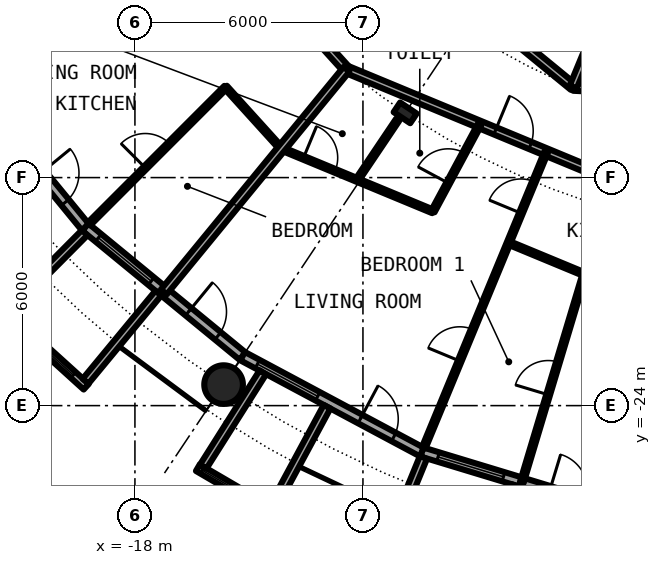
"""IFC4 building model, lengths in metres.
Left out: names, types, materials, properties, quantities, classifications, styles, units other than length and angle.
Written with IfcOpenShell. Run it as: python <this file> out.ifc"""

import sys

from ifc_helpers import new_model, si_unit, direction, frame, frame_2d, origin, origin_2d, place, context, subcontext, project, spatial, rectangle, circle, hollow_circle, i_section, extrude, element, fill, save


model = new_model("IFC4")
c1 = context("Model", 3, precision=1e-05, world=origin(), true_north=direction((0.0, 1.0)))
c2 = subcontext(c1, "Body", "Model", "MODEL_VIEW")
j1 = project(units=[si_unit("LENGTHUNIT", "METRE"), si_unit("PLANEANGLEUNIT", "RADIAN")], contexts=[c1])
p1 = place(None, origin())
s1 = spatial("IfcSite", under=j1, at=p1, CompositionType="ELEMENT")
p2 = place(p1, origin())
s2 = spatial("IfcBuilding", under=s1, at=p2, CompositionType="ELEMENT")
p3 = place(p2, frame((0.0, 0.0, 75.8)))
s3 = spatial("IfcBuildingStorey", under=s2, at=p3, CompositionType="ELEMENT", Elevation=75.8)
p4 = place(p3, frame((-15.667, -23.448, 0.0), z_axis=(0.0, 0.0, 1.0), x_axis=(1.0, 0.0, 0.0)))
e1 = element("IfcColumn", 1, at=p4, inside=s3, PredefinedType="COLUMN", context=c2, shape_type="SweptSolid", body=[
    extrude(hollow_circle(Radius=0.508, WallThickness=0.04, at=origin_2d()), origin(), (0.0, 0.0, 1.0), 3.05),
])
p5 = place(p3, frame((-10.889, -16.297, 0.0), z_axis=(0.0, 0.0, 1.0), x_axis=(-0.55557023302, -0.831469612303, 0.0)))
e2 = element("IfcColumn", 2, at=p5, inside=s3, PredefinedType="COLUMN", context=c2, shape_type="SweptSolid", body=[
    extrude(i_section(OverallWidth=0.306, OverallDepth=0.524, WebThickness=0.021, FlangeThickness=0.04, FilletRadius=0.027, at=origin_2d()), origin(), (0.0, 0.0, 1.0), 3.05),
])
p6 = place(p3, frame((-22.699, -15.167, 0.0), z_axis=(0.0, 0.0, 1.0), x_axis=(0.634382322723, -0.773019449054, 0.0)))
e3 = element("IfcWall", 3, at=p6, inside=s3, PredefinedType="SOLIDWALL", context=c2, shape_type="SweptSolid", body=[
    extrude(rectangle(XDim=5.352, YDim=0.25, at=frame_2d((2.676, 0.0))), origin(), (0.0, 0.0, 1.0), 2.7),
])
p7 = place(p6, frame((0.441, 0.0, 0.3)))
e4 = element("IfcOpeningElement", 4, at=p7, cuts=e3, PredefinedType="OPENING", context=c2, shape_type="SweptSolid", body=[
    extrude(rectangle(XDim=1.8, YDim=2.1, at=frame_2d((0.9, 1.05))), frame((0.0, 0.135, 0.0), z_axis=(0.0, -1.0, 0.0), x_axis=(1.0, 0.0, 0.0)), (0.0, 0.0, 1.0), 0.27),
])
p8 = place(p6, frame((3.51, 0.0, 0.0)))
e5 = element("IfcOpeningElement", 5, at=p8, cuts=e3, PredefinedType="OPENING", context=c2, shape_type="SweptSolid", body=[
    extrude(rectangle(XDim=1.0, YDim=2.2, at=frame_2d((0.5, 1.1))), frame((0.0, 0.135, 0.0), z_axis=(0.0, -1.0, 0.0), x_axis=(1.0, 0.0, 0.0)), (0.0, 0.0, 1.0), 0.27),
])
p9 = place(p3, frame((-19.304, -19.304, 0.0), z_axis=(0.0, 0.0, 1.0), x_axis=(0.773019449054, -0.634382322723, 0.0)))
e6 = element("IfcWall", 6, at=p9, inside=s3, PredefinedType="SOLIDWALL", context=c2, shape_type="SweptSolid", body=[
    extrude(rectangle(XDim=5.352, YDim=0.25, at=frame_2d((2.676, 0.0))), origin(), (0.0, 0.0, 1.0), 2.7),
])
p10 = place(p9, frame((0.441, 0.0, 0.3)))
e7 = element("IfcOpeningElement", 7, at=p10, cuts=e6, PredefinedType="OPENING", context=c2, shape_type="SweptSolid", body=[
    extrude(rectangle(XDim=1.8, YDim=2.1, at=frame_2d((0.9, 1.05))), frame((0.0, 0.135, 0.0), z_axis=(0.0, -1.0, 0.0), x_axis=(1.0, 0.0, 0.0)), (0.0, 0.0, 1.0), 0.27),
])
p11 = place(p9, frame((3.51, 0.0, 0.0)))
e8 = element("IfcOpeningElement", 8, at=p11, cuts=e6, PredefinedType="OPENING", context=c2, shape_type="SweptSolid", body=[
    extrude(rectangle(XDim=1.0, YDim=2.2, at=frame_2d((0.5, 1.1))), frame((0.0, 0.135, 0.0), z_axis=(0.0, -1.0, 0.0), x_axis=(1.0, 0.0, 0.0)), (0.0, 0.0, 1.0), 0.27),
])
p12 = place(p3, frame((-21.5, -21.493, -0.03), z_axis=(0.0, 0.0, 1.0), x_axis=(0.740998365753, -0.671506829416, 0.0)))
e9 = element("IfcWall", 9, at=p12, inside=s3, PredefinedType="SOLIDWALL", context=c2, shape_type="SweptSolid", body=[
    extrude(rectangle(XDim=2.993, YDim=0.2, at=frame_2d((1.497, 0.0))), origin(), (0.0, 0.0, 1.0), 2.73),
])
p13 = place(p12, frame((0.457, 0.0, 0.33)))
e10 = element("IfcOpeningElement", 10, at=p13, cuts=e9, PredefinedType="OPENING", context=c2, shape_type="SweptSolid", body=[
    extrude(circle(Radius=1.04, at=frame_2d((1.04, 1.04))), frame((0.0, 0.11, 0.0), z_axis=(0.0, -1.0, 0.0), x_axis=(1.0, 0.0, 0.0)), (0.0, 0.0, 1.0), 0.22),
])
p14 = place(p3, frame((-19.323, -19.45, -0.03), z_axis=(0.0, 0.0, 1.0), x_axis=(-0.704476739375, -0.709727076896, 0.0)))
e11 = element("IfcWall", 11, at=p14, inside=s3, PredefinedType="SOLIDWALL", context=c2, shape_type="SweptSolid", body=[
    extrude(rectangle(XDim=2.883, YDim=0.2, at=frame_2d((1.441, 0.0))), origin(), (0.0, 0.0, 1.0), 2.73),
])
p15 = place(p3, frame((-17.384, -21.041, -0.03), z_axis=(0.0, 0.0, 1.0), x_axis=(-0.63709551667, -0.770784861449, 0.0)))
e12 = element("IfcWall", 12, at=p15, inside=s3, PredefinedType="SOLIDWALL", context=c2, shape_type="SweptSolid", body=[
    extrude(rectangle(XDim=3.006, YDim=0.2, at=frame_2d((1.503, 0.0))), origin(), (0.0, 0.0, 1.0), 2.73),
])
p16 = place(p3, frame((-15.167, -22.699, 0.0), z_axis=(0.0, 0.0, 1.0), x_axis=(0.881915646801, -0.471407246368, 0.0)))
e13 = element("IfcWall", 13, at=p16, inside=s3, PredefinedType="SOLIDWALL", context=c2, shape_type="SweptSolid", body=[
    extrude(rectangle(XDim=5.352, YDim=0.25, at=frame_2d((2.676, 0.0))), origin(), (0.0, 0.0, 1.0), 2.7),
])
p17 = place(p16, frame((0.441, 0.0, 0.3)))
e14 = element("IfcOpeningElement", 14, at=p17, cuts=e13, PredefinedType="OPENING", context=c2, shape_type="SweptSolid", body=[
    extrude(rectangle(XDim=1.8, YDim=2.1, at=frame_2d((0.9, 1.05))), frame((0.0, 0.135, 0.0), z_axis=(0.0, -1.0, 0.0), x_axis=(1.0, 0.0, 0.0)), (0.0, 0.0, 1.0), 0.27),
])
p18 = place(p16, frame((3.51, 0.0, 0.0)))
e15 = element("IfcOpeningElement", 15, at=p18, cuts=e13, PredefinedType="OPENING", context=c2, shape_type="SweptSolid", body=[
    extrude(rectangle(XDim=1.0, YDim=2.2, at=frame_2d((0.5, 1.1))), frame((0.0, 0.135, 0.0), z_axis=(0.0, -1.0, 0.0), x_axis=(1.0, 0.0, 0.0)), (0.0, 0.0, 1.0), 0.27),
])
p19 = place(p3, frame((-16.344, -25.633, -0.03), z_axis=(0.0, 0.0, 1.0), x_axis=(0.863346521872, -0.504611517081, 0.0)))
e16 = element("IfcWall", 16, at=p19, inside=s3, PredefinedType="SOLIDWALL", context=c2, shape_type="SweptSolid", body=[
    extrude(rectangle(XDim=2.336, YDim=0.2, at=frame_2d((1.168, 0.0))), origin(), (0.0, 0.0, 1.0), 2.73),
])
p20 = place(p19, frame((0.128, 0.0, 0.33)))
e17 = element("IfcOpeningElement", 17, at=p20, cuts=e16, PredefinedType="OPENING", context=c2, shape_type="SweptSolid", body=[
    extrude(circle(Radius=1.04, at=frame_2d((1.04, 1.04))), frame((0.0, 0.11, 0.0), z_axis=(0.0, -1.0, 0.0), x_axis=(1.0, 0.0, 0.0)), (0.0, 0.0, 1.0), 0.22),
])
p21 = place(p3, frame((-14.635, -23.126, -0.03), z_axis=(0.0, 0.0, 1.0), x_axis=(-0.534437802731, -0.845207805816, 0.0)))
e18 = element("IfcWall", 18, at=p21, inside=s3, PredefinedType="SOLIDWALL", context=c2, shape_type="SweptSolid", body=[
    extrude(rectangle(XDim=2.932, YDim=0.2, at=frame_2d((1.466, 0.0))), origin(), (0.0, 0.0, 1.0), 2.73),
])
p22 = place(p3, frame((-12.945, -24.029, -0.03), z_axis=(0.0, 0.0, 1.0), x_axis=(-0.474424310775, -0.88029629861, 0.0)))
e19 = element("IfcWall", 19, at=p22, inside=s3, PredefinedType="SOLIDWALL", context=c2, shape_type="SweptSolid", body=[
    extrude(rectangle(XDim=3.006, YDim=0.2, at=frame_2d((1.503, 0.0))), origin(), (0.0, 0.0, 1.0), 2.73),
])
p23 = place(p3, frame((-10.447, -25.222, 0.0), z_axis=(0.0, 0.0, 1.0), x_axis=(0.956965678721, -0.290201119486, 0.0)))
e20 = element("IfcWall", 20, at=p23, inside=s3, PredefinedType="SOLIDWALL", context=c2, shape_type="SweptSolid", body=[
    extrude(rectangle(XDim=5.351, YDim=0.25, at=frame_2d((2.676, 0.0))), origin(), (0.0, 0.0, 1.0), 2.7),
])
p24 = place(p23, frame((0.441, 0.0, 0.3)))
e21 = element("IfcOpeningElement", 21, at=p24, cuts=e20, PredefinedType="OPENING", context=c2, shape_type="SweptSolid", body=[
    extrude(rectangle(XDim=1.8, YDim=2.1, at=frame_2d((0.9, 1.05))), frame((0.0, 0.135, 0.0), z_axis=(0.0, -1.0, 0.0), x_axis=(1.0, 0.0, 0.0)), (0.0, 0.0, 1.0), 0.27),
])
p25 = place(p23, frame((3.51, 0.0, 0.0)))
e22 = element("IfcOpeningElement", 22, at=p25, cuts=e20, PredefinedType="OPENING", context=c2, shape_type="SweptSolid", body=[
    extrude(rectangle(XDim=1.0, YDim=2.2, at=frame_2d((0.5, 1.1))), frame((0.0, 0.135, 0.0), z_axis=(0.0, -1.0, 0.0), x_axis=(1.0, 0.0, 0.0)), (0.0, 0.0, 1.0), 0.27),
])
p26 = place(p3, frame((-10.409, -25.364, -0.03), z_axis=(0.0, 0.0, 1.0), x_axis=(-0.379509886562, -0.925187681501, 0.0)))
e23 = element("IfcWall", 23, at=p26, inside=s3, PredefinedType="SOLIDWALL", context=c2, shape_type="SweptSolid", body=[
    extrude(rectangle(XDim=2.883, YDim=0.2, at=frame_2d((1.441, 0.0))), origin(), (0.0, 0.0, 1.0), 2.73),
])
p27 = place(p3, frame((-8.009, -26.092, -0.03), z_axis=(0.0, 0.0, 1.0), x_axis=(-0.293406695073, -0.955987715029, 0.0)))
e24 = element("IfcWall", 24, at=p27, inside=s3, PredefinedType="SOLIDWALL", context=c2, shape_type="SweptSolid", body=[
    extrude(rectangle(XDim=3.006, YDim=0.2, at=frame_2d((1.503, 0.0))), origin(), (0.0, 0.0, 1.0), 2.73),
])
p28 = place(p3, frame((-15.617, -15.617, 0.0), z_axis=(0.0, 0.0, 1.0), x_axis=(0.671144831591, -0.741326254107, 0.0)))
e25 = element("IfcWall", 25, at=p28, inside=s3, PredefinedType="PARTITIONING", context=c2, shape_type="SweptSolid", body=[
    extrude(rectangle(XDim=2.181, YDim=0.1, at=frame_2d((1.091, 0.0))), origin(), (0.0, 0.0, 1.0), 2.7),
])
p29 = place(p3, frame((-14.15, -17.236, 0.0), z_axis=(0.0, 0.0, 1.0), x_axis=(0.923789421174, -0.382900907975, 0.0)))
e26 = element("IfcWall", 26, at=p29, inside=s3, PredefinedType="PARTITIONING", context=c2, shape_type="SweptSolid", body=[
    extrude(rectangle(XDim=4.319, YDim=0.1, at=frame_2d((2.16, 0.0))), origin(), (0.0, 0.0, 1.0), 2.7),
])
p30 = place(p29, frame((0.634, 0.0, 0.0)))
e27 = element("IfcOpeningElement", 27, at=p30, cuts=e26, PredefinedType="OPENING", context=c2, shape_type="SweptSolid", body=[
    extrude(rectangle(XDim=0.9, YDim=2.3, at=frame_2d((0.45, 1.15))), frame((0.0, 0.06, 0.0), z_axis=(0.0, -1.0, 0.0), x_axis=(1.0, 0.0, 0.0)), (0.0, 0.0, 1.0), 0.12),
])
p31 = place(p3, frame((-8.168, -19.716, 0.0), z_axis=(0.0, 0.0, 1.0), x_axis=(0.923791567638, -0.382895729358, 0.0)))
e28 = element("IfcWall", 28, at=p31, inside=s3, PredefinedType="PARTITIONING", context=c2, shape_type="SweptSolid", body=[
    extrude(rectangle(XDim=6.474, YDim=0.1, at=frame_2d((3.237, 0.0))), origin(), (0.0, 0.0, 1.0), 2.7),
])
p32 = place(p3, frame((-16.193, -11.004, 0.0), z_axis=(0.0, 0.0, 1.0), x_axis=(0.671601747072, -0.740912338492, 0.0)))
e29 = element("IfcWall", 29, at=p32, inside=s3, PredefinedType="PARTITIONING", context=c2, shape_type="SweptSolid", body=[
    extrude(rectangle(XDim=5.597, YDim=0.2, at=frame_2d((2.799, 0.0))), origin(), (0.0, 0.0, 1.0), 2.38),
])
p33 = place(p32, frame((3.18, 0.0, 0.0)))
e30 = element("IfcOpeningElement", 30, at=p33, cuts=e29, PredefinedType="OPENING", context=c2, shape_type="SweptSolid", body=[
    extrude(rectangle(XDim=1.0, YDim=2.3, at=frame_2d((0.5, 1.15))), frame((0.0, 0.11, 0.0), z_axis=(0.0, -1.0, 0.0), x_axis=(1.0, 0.0, 0.0)), (0.0, 0.0, 1.0), 0.22),
])
p34 = place(p3, frame((-12.436, -15.15, 0.0), z_axis=(0.0, 0.0, 1.0), x_axis=(0.923858130651, -0.38273509694, 0.0)))
e31 = element("IfcWall", 31, at=p34, inside=s3, PredefinedType="PARTITIONING", context=c2, shape_type="SweptSolid", body=[
    extrude(rectangle(XDim=11.382, YDim=0.2, at=frame_2d((5.691, 0.0))), origin(), (0.0, 0.0, 1.0), 2.7),
])
p35 = place(p34, frame((4.239, 0.0, 0.0)))
e32 = element("IfcOpeningElement", 32, at=p35, cuts=e31, PredefinedType="OPENING", context=c2, shape_type="SweptSolid", body=[
    extrude(rectangle(XDim=1.0, YDim=2.3, at=frame_2d((0.5, 1.15))), frame((0.0, 0.11, 0.0), z_axis=(0.0, -1.0, 0.0), x_axis=(1.0, 0.0, 0.0)), (0.0, 0.0, 1.0), 0.22),
])
p36 = place(p3, frame((-14.05, -9.392, 0.0), z_axis=(0.0, 0.0, 1.0), x_axis=(0.773074935257, -0.634314704605, 0.0)))
e33 = element("IfcWall", 33, at=p36, inside=s3, PredefinedType="PARTITIONING", context=c2, shape_type="SweptSolid", body=[
    extrude(rectangle(XDim=9.809, YDim=0.2, at=frame_2d((4.904, 0.0))), origin(), (0.0, 0.0, 1.0), 2.7),
])
p37 = place(p36, frame((4.402, 0.0, 0.0)))
e34 = element("IfcOpeningElement", 34, at=p37, cuts=e33, PredefinedType="OPENING", context=c2, shape_type="SweptSolid", body=[
    extrude(rectangle(XDim=1.0, YDim=2.3, at=frame_2d((0.5, 1.15))), frame((0.0, 0.11, 0.0), z_axis=(0.0, -1.0, 0.0), x_axis=(1.0, 0.0, 0.0)), (0.0, 0.0, 1.0), 0.22),
])
p38 = place(p3, frame((-6.464, -15.616, 0.0), z_axis=(0.0, 0.0, 1.0), x_axis=(0.998805876564, -0.048855101495, 0.0)))
e35 = element("IfcWall", 35, at=p38, inside=s3, PredefinedType="PARTITIONING", context=c2, shape_type="SweptSolid", body=[
    extrude(rectangle(XDim=11.384, YDim=0.2, at=frame_2d((5.692, 0.0))), origin(), (0.0, 0.0, 1.0), 2.7),
])
p39 = place(p38, frame((6.004, 0.0, 0.0)))
e36 = element("IfcOpeningElement", 36, at=p39, cuts=e35, PredefinedType="OPENING", context=c2, shape_type="SweptSolid", body=[
    extrude(rectangle(XDim=1.0, YDim=2.3, at=frame_2d((0.5, 1.15))), frame((0.0, 0.11, 0.0), z_axis=(0.0, -1.0, 0.0), x_axis=(1.0, 0.0, 0.0)), (0.0, 0.0, 1.0), 0.22),
])
p40 = place(p3, frame((-22.595, -15.097, 0.0), z_axis=(0.0, 0.0, 1.0), x_axis=(0.831505405283, 0.555516661303, 0.0)))
e37 = element("IfcWall", 37, at=p40, inside=s3, PredefinedType="PARTITIONING", context=c2, shape_type="SweptSolid", body=[
    extrude(rectangle(XDim=7.312, YDim=0.2, at=frame_2d((3.656, 0.0))), origin(), (0.0, 0.0, 1.0), 2.7),
])
p41 = place(p3, frame((-19.21, -19.222, 0.0), z_axis=(0.0, 0.0, 1.0), x_axis=(0.706914880313, 0.707298629994, 0.0)))
e38 = element("IfcWall", 38, at=p41, inside=s3, PredefinedType="PARTITIONING", context=c2, shape_type="SweptSolid", body=[
    extrude(rectangle(XDim=5.09, YDim=0.1, at=frame_2d((2.545, 0.0))), origin(), (0.0, 0.0, 1.0), 2.7),
])
p42 = place(p41, frame((2.095, 0.0, 0.0)))
e39 = element("IfcOpeningElement", 39, at=p42, cuts=e38, PredefinedType="OPENING", context=c2, shape_type="SweptSolid", body=[
    extrude(rectangle(XDim=0.9, YDim=2.3, at=frame_2d((0.45, 1.15))), frame((0.0, 0.06, 0.0), z_axis=(0.0, -1.0, 0.0), x_axis=(1.0, 0.0, 0.0)), (0.0, 0.0, 1.0), 0.12),
])
p43 = place(p3, frame((-17.239, -21.008, 0.0), z_axis=(0.0, 0.0, 1.0), x_axis=(0.634318093068, 0.773072154981, 0.0)))
e40 = element("IfcWall", 40, at=p43, inside=s3, PredefinedType="PARTITIONING", context=c2, shape_type="SweptSolid", body=[
    extrude(rectangle(XDim=7.576, YDim=0.2, at=frame_2d((3.788, 0.0))), origin(), (0.0, 0.0, 1.0), 2.7),
])
p44 = place(p3, frame((-12.153, -18.064, 0.0), z_axis=(0.0, 0.0, 1.0), x_axis=(0.558383137663, 0.829583191472, 0.0)))
e41 = element("IfcWall", 41, at=p44, inside=s3, PredefinedType="PARTITIONING", context=c2, shape_type="SweptSolid", body=[
    extrude(rectangle(XDim=1.909, YDim=0.1, at=frame_2d((0.955, 0.0))), origin(), (0.0, 0.0, 1.0), 2.7),
])
p45 = place(p3, frame((-10.399, -25.106, 0.0), z_axis=(0.0, 0.0, 1.0), x_axis=(0.382697543868, 0.923873687209, 0.0)))
e42 = element("IfcWall", 42, at=p45, inside=s3, PredefinedType="PARTITIONING", context=c2, shape_type="SweptSolid", body=[
    extrude(rectangle(XDim=8.419, YDim=0.1, at=frame_2d((4.209, 0.0))), origin(), (0.0, 0.0, 1.0), 2.7),
])
p46 = place(p45, frame((6.678, 0.0, 0.0)))
e43 = element("IfcOpeningElement", 43, at=p46, cuts=e42, PredefinedType="OPENING", context=c2, shape_type="SweptSolid", body=[
    extrude(rectangle(XDim=0.9, YDim=2.3, at=frame_2d((0.45, 1.15))), frame((0.0, 0.06, 0.0), z_axis=(0.0, -1.0, 0.0), x_axis=(1.0, 0.0, 0.0)), (0.0, 0.0, 1.0), 0.12),
])
p47 = place(p45, frame((2.468, 0.0, 0.0)))
e44 = element("IfcOpeningElement", 44, at=p47, cuts=e42, PredefinedType="OPENING", context=c2, shape_type="SweptSolid", body=[
    extrude(rectangle(XDim=0.9, YDim=2.3, at=frame_2d((0.45, 1.15))), frame((0.0, 0.06, 0.0), z_axis=(0.0, -1.0, 0.0), x_axis=(1.0, 0.0, 0.0)), (0.0, 0.0, 1.0), 0.12),
])
p48 = place(p3, frame((-10.16, -18.89, 0.0), z_axis=(0.0, 0.0, 1.0), x_axis=(0.4736792609, 0.880697426925, 0.0)))
e45 = element("IfcWall", 45, at=p48, inside=s3, PredefinedType="PARTITIONING", context=c2, shape_type="SweptSolid", body=[
    extrude(rectangle(XDim=2.597, YDim=0.1, at=frame_2d((1.298, 0.0))), origin(), (0.0, 0.0, 1.0), 2.7),
])
p49 = place(p48, frame((0.848, 0.0, 0.0)))
e46 = element("IfcOpeningElement", 46, at=p49, cuts=e45, PredefinedType="OPENING", context=c2, shape_type="SweptSolid", body=[
    extrude(rectangle(XDim=0.9, YDim=2.3, at=frame_2d((0.45, 1.15))), frame((0.0, 0.06, 0.0), z_axis=(0.0, -1.0, 0.0), x_axis=(1.0, 0.0, 0.0)), (0.0, 0.0, 1.0), 0.12),
])
p50 = place(p3, frame((-7.821, -26.025, 0.0), z_axis=(0.0, 0.0, 1.0), x_axis=(0.287793773423, 0.957692405723, 0.0)))
e47 = element("IfcWall", 47, at=p50, inside=s3, PredefinedType="PARTITIONING", context=c2, shape_type="SweptSolid", body=[
    extrude(rectangle(XDim=5.726, YDim=0.1, at=frame_2d((2.863, 0.0))), origin(), (0.0, 0.0, 1.0), 2.7),
])
p51 = place(p50, frame((2.413, 0.0, 0.0)))
e48 = element("IfcOpeningElement", 48, at=p51, cuts=e47, PredefinedType="OPENING", context=c2, shape_type="SweptSolid", body=[
    extrude(rectangle(XDim=0.9, YDim=2.3, at=frame_2d((0.45, 1.15))), frame((0.0, 0.06, 0.0), z_axis=(0.0, -1.0, 0.0), x_axis=(1.0, 0.0, 0.0)), (0.0, 0.0, 1.0), 0.12),
])
p52 = place(p3, frame((-6.467, -15.614, 0.0), z_axis=(0.0, 0.0, 1.0), x_axis=(0.382646942224, 0.923894646378, 0.0)))
e49 = element("IfcWall", 49, at=p52, inside=s3, PredefinedType="PARTITIONING", context=c2, shape_type="SweptSolid", body=[
    extrude(rectangle(XDim=9.181, YDim=0.2, at=frame_2d((4.59, 0.0))), origin(), (0.0, 0.0, 1.0), 2.7),
])
p53 = place(p8, origin())
e50 = element("IfcDoor", 50, at=p53, inside=s3, OperationType="SINGLE_SWING_LEFT", PredefinedType="DOOR", context=c2, shape_type="SweptSolid", body=[
    extrude(rectangle(XDim=1.0, YDim=2.2, at=frame_2d((0.5, 1.1))), frame((0.0, 0.025, 0.0), z_axis=(0.0, -1.0, 0.0), x_axis=(1.0, 0.0, 0.0)), (0.0, 0.0, 1.0), 0.05),
])
fill(e5, e50)
p54 = place(p10, origin())
e51 = element("IfcWindow", 51, at=p54, inside=s3, PartitioningType="SINGLE_PANEL", PredefinedType="WINDOW", context=c2, shape_type="SweptSolid", body=[
    extrude(rectangle(XDim=1.8, YDim=2.1, at=frame_2d((0.9, 1.05))), frame((0.0, 0.03, 0.0), z_axis=(0.0, -1.0, 0.0), x_axis=(1.0, 0.0, 0.0)), (0.0, 0.0, 1.0), 0.06),
])
fill(e7, e51)
p55 = place(p13, origin())
e52 = element("IfcWindow", 52, at=p55, inside=s3, PartitioningType="SINGLE_PANEL", PredefinedType="WINDOW", context=c2, shape_type="SweptSolid", body=[
    extrude(circle(Radius=1.04, at=frame_2d((1.04, 1.04))), frame((0.0, 0.03, 0.0), z_axis=(0.0, -1.0, 0.0), x_axis=(1.0, 0.0, 0.0)), (0.0, 0.0, 1.0), 0.06),
])
fill(e10, e52)
p56 = place(p11, origin())
e53 = element("IfcDoor", 53, at=p56, inside=s3, OperationType="SINGLE_SWING_LEFT", PredefinedType="DOOR", context=c2, shape_type="SweptSolid", body=[
    extrude(rectangle(XDim=1.0, YDim=2.2, at=frame_2d((0.5, 1.1))), frame((0.0, 0.025, 0.0), z_axis=(0.0, -1.0, 0.0), x_axis=(1.0, 0.0, 0.0)), (0.0, 0.0, 1.0), 0.05),
])
fill(e8, e53)
p57 = place(p17, origin())
e54 = element("IfcWindow", 54, at=p57, inside=s3, PartitioningType="SINGLE_PANEL", PredefinedType="WINDOW", context=c2, shape_type="SweptSolid", body=[
    extrude(rectangle(XDim=1.8, YDim=2.1, at=frame_2d((0.9, 1.05))), frame((0.0, 0.03, 0.0), z_axis=(0.0, -1.0, 0.0), x_axis=(1.0, 0.0, 0.0)), (0.0, 0.0, 1.0), 0.06),
])
fill(e14, e54)
p58 = place(p20, origin())
e55 = element("IfcWindow", 55, at=p58, inside=s3, PartitioningType="SINGLE_PANEL", PredefinedType="WINDOW", context=c2, shape_type="SweptSolid", body=[
    extrude(circle(Radius=1.04, at=frame_2d((1.04, 1.04))), frame((0.0, 0.03, 0.0), z_axis=(0.0, -1.0, 0.0), x_axis=(1.0, 0.0, 0.0)), (0.0, 0.0, 1.0), 0.06),
])
fill(e17, e55)
p59 = place(p18, origin())
e56 = element("IfcDoor", 56, at=p59, inside=s3, OperationType="SINGLE_SWING_LEFT", PredefinedType="DOOR", context=c2, shape_type="SweptSolid", body=[
    extrude(rectangle(XDim=1.0, YDim=2.2, at=frame_2d((0.5, 1.1))), frame((0.0, 0.025, 0.0), z_axis=(0.0, -1.0, 0.0), x_axis=(1.0, 0.0, 0.0)), (0.0, 0.0, 1.0), 0.05),
])
fill(e15, e56)
p60 = place(p24, origin())
e57 = element("IfcWindow", 57, at=p60, inside=s3, PartitioningType="SINGLE_PANEL", PredefinedType="WINDOW", context=c2, shape_type="SweptSolid", body=[
    extrude(rectangle(XDim=1.8, YDim=2.1, at=frame_2d((0.9, 1.05))), frame((0.0, 0.03, 0.0), z_axis=(0.0, -1.0, 0.0), x_axis=(1.0, 0.0, 0.0)), (0.0, 0.0, 1.0), 0.06),
])
fill(e21, e57)
p61 = place(p42, origin())
e58 = element("IfcDoor", 58, at=p61, inside=s3, OperationType="SINGLE_SWING_RIGHT", PredefinedType="DOOR", context=c2, shape_type="SweptSolid", body=[
    extrude(rectangle(XDim=0.9, YDim=2.3, at=frame_2d((0.45, 1.15))), frame((0.0, 0.025, 0.0), z_axis=(0.0, -1.0, 0.0), x_axis=(1.0, 0.0, 0.0)), (0.0, 0.0, 1.0), 0.05),
])
fill(e39, e58)
p62 = place(p35, origin())
e59 = element("IfcDoor", 59, at=p62, inside=s3, OperationType="SINGLE_SWING_LEFT", PredefinedType="DOOR", context=c2, shape_type="SweptSolid", body=[
    extrude(rectangle(XDim=1.0, YDim=2.3, at=frame_2d((0.5, 1.15))), frame((0.0, 0.025, 0.0), z_axis=(0.0, -1.0, 0.0), x_axis=(1.0, 0.0, 0.0)), (0.0, 0.0, 1.0), 0.05),
])
fill(e32, e59)
p63 = place(p30, origin())
e60 = element("IfcDoor", 60, at=p63, inside=s3, OperationType="SINGLE_SWING_LEFT", PredefinedType="DOOR", context=c2, shape_type="SweptSolid", body=[
    extrude(rectangle(XDim=0.9, YDim=2.3, at=frame_2d((0.45, 1.15))), frame((0.0, 0.025, 0.0), z_axis=(0.0, -1.0, 0.0), x_axis=(1.0, 0.0, 0.0)), (0.0, 0.0, 1.0), 0.05),
])
fill(e27, e60)
p64 = place(p49, origin())
e61 = element("IfcDoor", 61, at=p64, inside=s3, OperationType="SINGLE_SWING_LEFT", PredefinedType="DOOR", context=c2, shape_type="SweptSolid", body=[
    extrude(rectangle(XDim=0.9, YDim=2.3, at=frame_2d((0.45, 1.15))), frame((0.0, 0.025, 0.0), z_axis=(0.0, -1.0, 0.0), x_axis=(1.0, 0.0, 0.0)), (0.0, 0.0, 1.0), 0.05),
])
fill(e46, e61)
p65 = place(p46, origin())
e62 = element("IfcDoor", 62, at=p65, inside=s3, OperationType="SINGLE_SWING_RIGHT", PredefinedType="DOOR", context=c2, shape_type="SweptSolid", body=[
    extrude(rectangle(XDim=0.9, YDim=2.3, at=frame_2d((0.45, 1.15))), frame((0.0, 0.025, 0.0), z_axis=(0.0, -1.0, 0.0), x_axis=(1.0, 0.0, 0.0)), (0.0, 0.0, 1.0), 0.05),
])
fill(e43, e62)
p66 = place(p47, origin())
e63 = element("IfcDoor", 63, at=p66, inside=s3, OperationType="SINGLE_SWING_LEFT", PredefinedType="DOOR", context=c2, shape_type="SweptSolid", body=[
    extrude(rectangle(XDim=0.9, YDim=2.3, at=frame_2d((0.45, 1.15))), frame((0.0, 0.025, 0.0), z_axis=(0.0, -1.0, 0.0), x_axis=(1.0, 0.0, 0.0)), (0.0, 0.0, 1.0), 0.05),
])
fill(e44, e63)
p67 = place(p51, origin())
e64 = element("IfcDoor", 64, at=p67, inside=s3, OperationType="SINGLE_SWING_LEFT", PredefinedType="DOOR", context=c2, shape_type="SweptSolid", body=[
    extrude(rectangle(XDim=0.9, YDim=2.3, at=frame_2d((0.45, 1.15))), frame((0.0, 0.025, 0.0), z_axis=(0.0, -1.0, 0.0), x_axis=(1.0, 0.0, 0.0)), (0.0, 0.0, 1.0), 0.05),
])
fill(e48, e64)
save(model, sys.argv[1])
